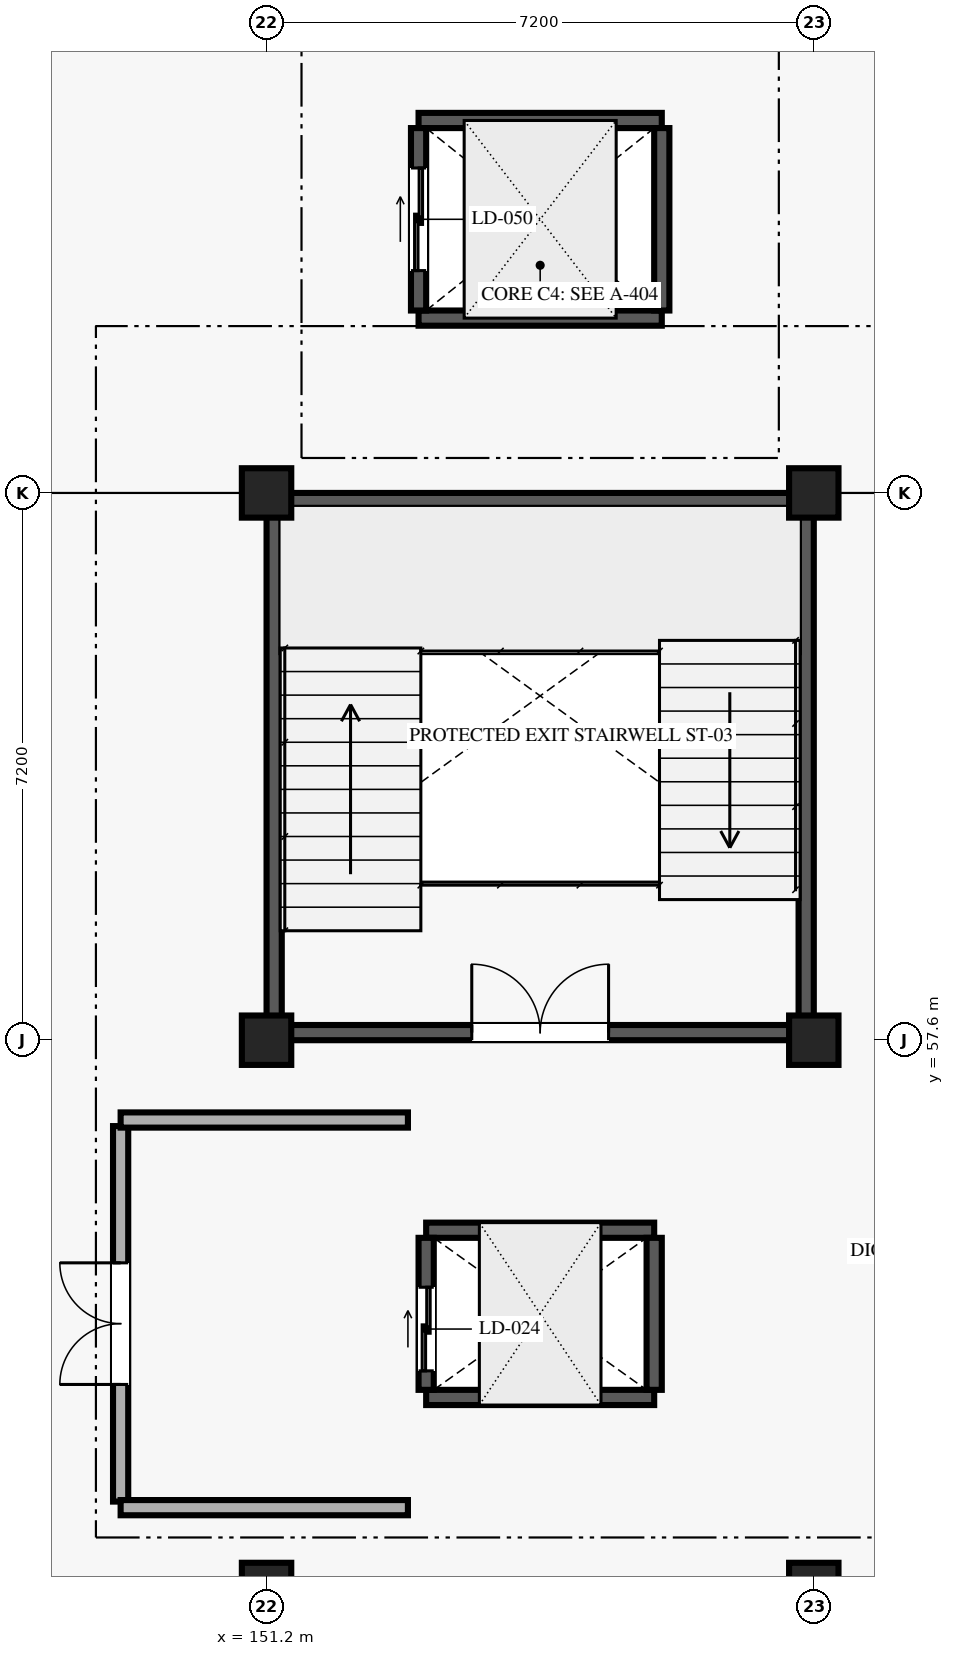
"""IFC4 building model, lengths in metres.
Left out: names, types, materials, properties, quantities, classifications, styles, units other than length and angle.
Written with IfcOpenShell. Run it as: python <this file> out.ifc"""

import sys

from ifc_helpers import new_model, si_unit, direction, frame, frame_2d, origin, origin_2d, place, context, subcontext, project, spatial, rectangle, extrude, element, fill, save


model = new_model("IFC4")
c1 = context("Model", 3, precision=1e-05, world=origin(), true_north=direction((0.0, 1.0)))
c2 = subcontext(c1, "Body", "Model", "MODEL_VIEW")
j1 = project(units=[si_unit("LENGTHUNIT", "METRE"), si_unit("PLANEANGLEUNIT", "RADIAN")], contexts=[c1])
p1 = place(None, origin())
s1 = spatial("IfcSite", under=j1, at=p1, CompositionType="ELEMENT")
p2 = place(p1, origin())
s2 = spatial("IfcBuilding", under=s1, at=p2, CompositionType="ELEMENT")
p3 = place(p2, frame((0.0, 0.0, 17.55)))
s3 = spatial("IfcBuildingStorey", under=s2, at=p3, CompositionType="ELEMENT", Elevation=17.55)
for number, where, z_axis, x_axis in (
    (1, (151.2, 50.4, 0.0), (0.0, 0.0, 1.0), (1.0, 0.0, 0.0)),
    (2, (151.2, 57.6, 0.0), (0.0, 0.0, 1.0), (1.0, 0.0, 0.0)),
    (3, (151.2, 64.8, 0.0), (0.0, 0.0, 1.0), (1.0, 0.0, 0.0)),
    (4, (158.4, 50.4, 0.0), (0.0, 0.0, 1.0), (1.0, 0.0, 0.0)),
    (5, (158.4, 57.6, 0.0), (0.0, 0.0, 1.0), (1.0, 0.0, 0.0)),
    (6, (158.4, 64.8, 0.0), (0.0, 0.0, 1.0), (1.0, 0.0, 0.0)),
):
    element("IfcColumn", number, at=place(p3, frame(where, z_axis=z_axis, x_axis=x_axis)), inside=s3, PredefinedType="COLUMN", context=c2, shape_type="SweptSolid", body=[
        extrude(rectangle(XDim=0.65, YDim=0.65, at=origin_2d()), origin(), (0.0, 0.0, 1.0), 4.05),
    ])
p4 = place(p3, frame((151.4, 57.7, 0.0), z_axis=(0.0, 0.0, 1.0), x_axis=(1.0, 0.0, 0.0)))
e7 = element("IfcWall", 7, at=p4, inside=s3, PredefinedType="SHEAR", context=c2, shape_type="SweptSolid", body=[
    extrude(rectangle(XDim=6.8, YDim=0.2, at=frame_2d((3.4, 0.0))), origin(), (0.0, 0.0, 1.0), 3.83),
])
p5 = place(p4, frame((2.5, 0.0, 0.0)))
e8 = element("IfcOpeningElement", 8, at=p5, cuts=e7, PredefinedType="OPENING", context=c2, shape_type="SweptSolid", body=[
    extrude(rectangle(XDim=1.8, YDim=2.2, at=frame_2d((0.9, 1.1))), frame((0.0, 0.11, 0.0), z_axis=(0.0, -1.0, 0.0), x_axis=(1.0, 0.0, 0.0)), (0.0, 0.0, 1.0), 0.22),
])
for number, where, z_axis, x_axis in (
    (9, (151.4, 64.7, 0.0), (0.0, 0.0, 1.0), (1.0, 0.0, 0.0)),
    (10, (151.3, 57.8, 0.0), (0.0, 0.0, 1.0), (0.0, 1.0, 0.0)),
    (11, (158.3, 57.8, 0.0), (0.0, 0.0, 1.0), (0.0, 1.0, 0.0)),
):
    element("IfcWall", number, at=place(p3, frame(where, z_axis=z_axis, x_axis=x_axis)), inside=s3, PredefinedType="SHEAR", context=c2, shape_type="SweptSolid", body=[
        extrude(rectangle(XDim=6.8, YDim=0.2, at=frame_2d((3.4, 0.0))), origin(), (0.0, 0.0, 1.0), 3.83),
    ])
for number, where, z_axis, x_axis in (
    (12, (153.3, 52.9, 0.0), (0.0, 0.0, 1.0), (1.0, 0.0, 0.0)),
    (13, (153.3, 55.1, 0.0), (0.0, 0.0, 1.0), (1.0, 0.0, 0.0)),
):
    element("IfcWall", number, at=place(p3, frame(where, z_axis=z_axis, x_axis=x_axis)), inside=s3, PredefinedType="SHEAR", context=c2, shape_type="SweptSolid", body=[
        extrude(rectangle(XDim=3.0, YDim=0.2, at=frame_2d((1.5, 0.0))), origin(), (0.0, 0.0, 1.0), 3.83),
    ])
p6 = place(p3, frame((153.3, 53.0, 0.0), z_axis=(0.0, 0.0, 1.0), x_axis=(0.0, 1.0, 0.0)))
e14 = element("IfcWall", 14, at=p6, inside=s3, PredefinedType="SHEAR", context=c2, shape_type="SweptSolid", body=[
    extrude(rectangle(XDim=2.0, YDim=0.2, at=frame_2d((1.0, 0.0))), origin(), (0.0, 0.0, 1.0), 3.83),
])
p7 = place(p6, frame((0.25, 0.0, 0.0)))
e15 = element("IfcOpeningElement", 15, at=p7, cuts=e14, PredefinedType="OPENING", context=c2, shape_type="SweptSolid", body=[
    extrude(rectangle(XDim=1.1, YDim=2.15, at=frame_2d((0.55, 1.075))), frame((0.0, 0.11, 0.0), z_axis=(0.0, -1.0, 0.0), x_axis=(1.0, 0.0, 0.0)), (0.0, 0.0, 1.0), 0.22),
])
p8 = place(p3, frame((156.3, 53.0, 0.0), z_axis=(0.0, 0.0, 1.0), x_axis=(0.0, 1.0, 0.0)))
e16 = element("IfcWall", 16, at=p8, inside=s3, PredefinedType="SHEAR", context=c2, shape_type="SweptSolid", body=[
    extrude(rectangle(XDim=2.0, YDim=0.2, at=frame_2d((1.0, 0.0))), origin(), (0.0, 0.0, 1.0), 3.83),
])
for number, where, z_axis, x_axis in (
    (17, (153.2, 67.1, 0.0), (0.0, 0.0, 1.0), (1.0, 0.0, 0.0)),
    (18, (153.2, 69.7, 0.0), (0.0, 0.0, 1.0), (1.0, 0.0, 0.0)),
):
    element("IfcWall", number, at=place(p3, frame(where, z_axis=z_axis, x_axis=x_axis)), inside=s3, PredefinedType="SHEAR", context=c2, shape_type="SweptSolid", body=[
        extrude(rectangle(XDim=3.2, YDim=0.2, at=frame_2d((1.6, 0.0))), origin(), (0.0, 0.0, 1.0), 3.83),
    ])
p9 = place(p3, frame((153.2, 67.2, 0.0), z_axis=(0.0, 0.0, 1.0), x_axis=(0.0, 1.0, 0.0)))
e19 = element("IfcWall", 19, at=p9, inside=s3, PredefinedType="SHEAR", context=c2, shape_type="SweptSolid", body=[
    extrude(rectangle(XDim=2.4, YDim=0.2, at=frame_2d((1.2, 0.0))), origin(), (0.0, 0.0, 1.0), 3.83),
])
p10 = place(p9, frame((0.525, 0.0, 0.0)))
e20 = element("IfcOpeningElement", 20, at=p10, cuts=e19, PredefinedType="OPENING", context=c2, shape_type="SweptSolid", body=[
    extrude(rectangle(XDim=1.35, YDim=2.2, at=frame_2d((0.675, 1.1))), frame((0.0, 0.11, 0.0), z_axis=(0.0, -1.0, 0.0), x_axis=(1.0, 0.0, 0.0)), (0.0, 0.0, 1.0), 0.22),
])
p11 = place(p3, frame((156.4, 67.2, 0.0), z_axis=(0.0, 0.0, 1.0), x_axis=(0.0, 1.0, 0.0)))
e21 = element("IfcWall", 21, at=p11, inside=s3, PredefinedType="SHEAR", context=c2, shape_type="SweptSolid", body=[
    extrude(rectangle(XDim=2.4, YDim=0.2, at=frame_2d((1.2, 0.0))), origin(), (0.0, 0.0, 1.0), 3.83),
])
p12 = place(p3, frame((149.28, 51.53, 0.0), z_axis=(0.0, 0.0, 1.0), x_axis=(0.0, 1.0, 0.0)))
e22 = element("IfcWall", 22, at=p12, inside=s3, PredefinedType="SOLIDWALL", context=c2, shape_type="SweptSolid", body=[
    extrude(rectangle(XDim=4.94, YDim=0.2, at=frame_2d((2.47, 0.0))), origin(), (0.0, 0.0, 1.0), 3.83),
])
p13 = place(p12, frame((1.541, 0.0, 0.0)))
e23 = element("IfcOpeningElement", 23, at=p13, cuts=e22, PredefinedType="OPENING", context=c2, shape_type="SweptSolid", body=[
    extrude(rectangle(XDim=1.6, YDim=2.2, at=frame_2d((0.8, 1.1))), frame((0.0, 0.11, 0.0), z_axis=(0.0, -1.0, 0.0), x_axis=(1.0, 0.0, 0.0)), (0.0, 0.0, 1.0), 0.22),
])
for number, where, z_axis, x_axis in (
    (24, (149.28, 51.45, 0.0), (0.0, 0.0, 1.0), (1.0, 0.0, 0.0)),
    (25, (149.28, 56.55, 0.0), (0.0, 0.0, 1.0), (1.0, 0.0, 0.0)),
):
    element("IfcWall", number, at=place(p3, frame(where, z_axis=z_axis, x_axis=x_axis)), inside=s3, PredefinedType="SOLIDWALL", context=c2, shape_type="SweptSolid", body=[
        extrude(rectangle(XDim=3.78, YDim=0.2, at=frame_2d((1.89, 0.0))), origin(), (0.0, 0.0, 1.0), 3.83),
    ])
p14 = place(p5, origin())
e26 = element("IfcDoor", 26, at=p14, inside=s3, OperationType="DOUBLE_DOOR_SINGLE_SWING", PredefinedType="DOOR", context=c2, shape_type="SweptSolid", body=[
    extrude(rectangle(XDim=1.8, YDim=2.2, at=frame_2d((0.9, 1.1))), frame((0.0, 0.025, 0.0), z_axis=(0.0, -1.0, 0.0), x_axis=(1.0, 0.0, 0.0)), (0.0, 0.0, 1.0), 0.05),
])
fill(e8, e26)
p15 = place(p7, origin())
e27 = element("IfcDoor", 27, at=p15, inside=s3, OperationType="DOUBLE_DOOR_SLIDING", PredefinedType="DOOR", context=c2, shape_type="SweptSolid", body=[
    extrude(rectangle(XDim=1.1, YDim=2.15, at=frame_2d((0.55, 1.075))), frame((0.0, 0.025, 0.0), z_axis=(0.0, -1.0, 0.0), x_axis=(1.0, 0.0, 0.0)), (0.0, 0.0, 1.0), 0.05),
])
fill(e15, e27)
p16 = place(p10, origin())
e28 = element("IfcDoor", 28, at=p16, inside=s3, OperationType="DOUBLE_DOOR_SLIDING", PredefinedType="DOOR", context=c2, shape_type="SweptSolid", body=[
    extrude(rectangle(XDim=1.35, YDim=2.2, at=frame_2d((0.675, 1.1))), frame((0.0, 0.025, 0.0), z_axis=(0.0, -1.0, 0.0), x_axis=(1.0, 0.0, 0.0)), (0.0, 0.0, 1.0), 0.05),
])
fill(e20, e28)
p17 = place(p13, origin())
e29 = element("IfcDoor", 29, at=p17, inside=s3, OperationType="DOUBLE_DOOR_SINGLE_SWING", PredefinedType="DOOR", context=c2, shape_type="SweptSolid", body=[
    extrude(rectangle(XDim=1.6, YDim=2.2, at=frame_2d((0.8, 1.1))), frame((0.0, 0.025, 0.0), z_axis=(0.0, -1.0, 0.0), x_axis=(1.0, 0.0, 0.0)), (0.0, 0.0, 1.0), 0.05),
])
fill(e23, e29)
save(model, sys.argv[1])
